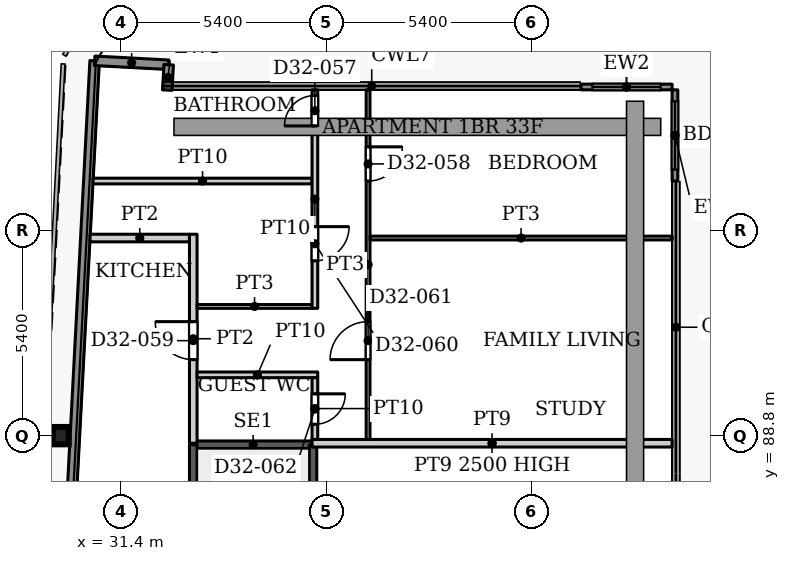
"""IFC4 building model, lengths in metres.
Left out: names, types, materials, properties, quantities, classifications, styles, units other than length and angle.
Written with IfcOpenShell. Run it as: python <this file> out.ifc"""

import sys

from ifc_helpers import new_model, si_unit, direction, frame, frame_2d, origin, origin_2d, place, context, subcontext, project, spatial, rectangle, i_section, extrude, source, transform, mapped, element, fill, save


model = new_model("IFC4")
c1 = context("Model", 3, precision=1e-05, world=origin(), true_north=direction((0.0, 1.0)))
c2 = subcontext(c1, "Body", "Model", "MODEL_VIEW")
j1 = project(units=[si_unit("LENGTHUNIT", "METRE"), si_unit("PLANEANGLEUNIT", "RADIAN")], contexts=[c1])
p1 = place(None, origin())
s1 = spatial("IfcSite", under=j1, at=p1, CompositionType="ELEMENT")
p2 = place(p1, origin())
s2 = spatial("IfcBuilding", under=s1, at=p2, CompositionType="ELEMENT")
p3 = place(p2, frame((0.0, 0.0, 140.9)))
s3 = spatial("IfcBuildingStorey", under=s2, at=p3, CompositionType="ELEMENT", Elevation=140.9)
p4 = place(p3, frame((29.811, 88.8, 0.0), z_axis=(0.0, 0.0, 1.0), x_axis=(1.0, 0.0, 0.0)))
e1 = element("IfcColumn", 1, at=p4, inside=s3, PredefinedType="COLUMN", context=c2, shape_type="SweptSolid", body=[
    extrude(i_section(OverallWidth=0.418, OverallDepth=0.455, WebThickness=0.042, FlangeThickness=0.068, FilletRadius=0.014, at=origin_2d()), origin(), (0.0, 0.0, 1.0), 3.9),
])
p5 = place(p3, frame((27.195, 31.969, 0.0), z_axis=(0.0, 0.0, 1.0), x_axis=(0.052554995867, 0.998618031286, 0.0)))
e2 = element("IfcWall", 2, at=p5, inside=s3, PredefinedType="SOLIDWALL", context=c2, shape_type="SweptSolid", body=[
    extrude(rectangle(XDim=66.787, YDim=0.25, at=frame_2d((33.394, 0.0))), origin(), (0.0, 0.0, 1.0), 3.75),
])
p6 = place(p3, frame((30.705, 98.664, 0.0), z_axis=(0.0, 0.0, 1.0), x_axis=(0.998577785791, -0.053314216913, 0.0)))
e3 = element("IfcWall", 3, at=p6, inside=s3, PredefinedType="SOLIDWALL", context=c2, shape_type="SweptSolid", body=[
    extrude(rectangle(XDim=1.951, YDim=0.25, at=frame_2d((0.975, 0.0))), origin(), (0.0, 0.0, 1.0), 3.75),
])
p7 = place(p3, frame((32.653, 98.56, 0.0), z_axis=(0.0, 0.0, 1.0), x_axis=(-0.054093451632, -0.998535877418, 0.0)))
e4 = element("IfcWall", 4, at=p7, inside=s3, PredefinedType="SOLIDWALL", context=c2, shape_type="SweptSolid", body=[
    extrude(rectangle(XDim=0.668, YDim=0.25, at=frame_2d((0.334, 0.0))), origin(), (0.0, 0.0, 1.0), 3.75),
])
p8 = place(p3, frame((43.5, 97.975, 0.0), z_axis=(0.0, 0.0, 1.0), x_axis=(1.0, 0.0, 0.0)))
e5 = element("IfcWall", 5, at=p8, inside=s3, PredefinedType="SOLIDWALL", context=c2, shape_type="SweptSolid", body=[
    extrude(rectangle(XDim=2.4, YDim=0.15, at=frame_2d((1.2, 0.0))), origin(), (0.0, 0.0, 1.0), 3.75),
])
p9 = place(p8, frame((0.3, 0.0, 0.0)))
e6 = element("IfcOpeningElement", 6, at=p9, cuts=e5, PredefinedType="OPENING", context=c2, shape_type="SweptSolid", body=[
    extrude(rectangle(XDim=1.8, YDim=2.4, at=frame_2d((0.9, 1.2))), frame((0.0, 0.085, 0.0), z_axis=(0.0, -1.0, 0.0), x_axis=(1.0, 0.0, 0.0)), (0.0, 0.0, 1.0), 0.17),
])
p10 = place(p3, frame((45.975, 97.9, 0.0), z_axis=(0.0, 0.0, 1.0), x_axis=(0.0, -1.0, 0.0)))
e7 = element("IfcWall", 7, at=p10, inside=s3, PredefinedType="SOLIDWALL", context=c2, shape_type="SweptSolid", body=[
    extrude(rectangle(XDim=2.4, YDim=0.15, at=frame_2d((1.2, 0.0))), origin(), (0.0, 0.0, 1.0), 3.75),
])
p11 = place(p10, frame((0.3, 0.0, 0.0)))
e8 = element("IfcOpeningElement", 8, at=p11, cuts=e7, PredefinedType="OPENING", context=c2, shape_type="SweptSolid", body=[
    extrude(rectangle(XDim=1.8, YDim=2.4, at=frame_2d((0.9, 1.2))), frame((0.0, 0.085, 0.0), z_axis=(0.0, -1.0, 0.0), x_axis=(1.0, 0.0, 0.0)), (0.0, 0.0, 1.0), 0.17),
])
p12 = place(p3, frame((33.3, 88.56, 0.0), z_axis=(0.0, 0.0, 1.0), x_axis=(1.0, 0.0, 0.0)))
e9 = element("IfcWall", 9, at=p12, inside=s3, PredefinedType="SHEAR", context=c2, shape_type="SweptSolid", body=[
    extrude(rectangle(XDim=3.15, YDim=0.2, at=frame_2d((1.575, 0.0))), origin(), (0.0, 0.0, 1.0), 3.9),
])
p13 = place(p3, frame((33.3, 79.4, 0.0), z_axis=(0.0, 0.0, 1.0), x_axis=(0.0, 1.0, 0.0)))
e10 = element("IfcWall", 10, at=p13, inside=s3, PredefinedType="SHEAR", context=c2, shape_type="SweptSolid", body=[
    extrude(rectangle(XDim=9.16, YDim=0.2, at=frame_2d((4.58, 0.0))), origin(), (0.0, 0.0, 1.0), 3.9),
])
p14 = place(p13, frame((0.35, 0.0, 0.0)))
e11 = element("IfcOpeningElement", 11, at=p14, cuts=e10, PredefinedType="OPENING", context=c2, shape_type="SweptSolid", body=[
    extrude(rectangle(XDim=1.1, YDim=2.2, at=frame_2d((0.55, 1.1))), frame((0.0, 0.11, 0.0), z_axis=(0.0, -1.0, 0.0), x_axis=(1.0, 0.0, 0.0)), (0.0, 0.0, 1.0), 0.22),
])
p15 = place(p3, frame((36.45, 79.4, 0.0), z_axis=(0.0, 0.0, 1.0), x_axis=(0.0, 1.0, 0.0)))
e12 = element("IfcWall", 12, at=p15, inside=s3, PredefinedType="SHEAR", context=c2, shape_type="SweptSolid", body=[
    extrude(rectangle(XDim=9.16, YDim=0.2, at=frame_2d((4.58, 0.0))), origin(), (0.0, 0.0, 1.0), 3.9),
])
p16 = place(p3, frame((30.664, 95.5, 0.0), z_axis=(0.0, 0.0, 1.0), x_axis=(1.0, 0.0, 0.0)))
e13 = element("IfcWall", 13, at=p16, inside=s3, PredefinedType="PARTITIONING", context=c2, shape_type="SweptSolid", body=[
    extrude(rectangle(XDim=5.761, YDim=0.15, at=frame_2d((2.88, 0.0))), origin(), (0.0, 0.0, 1.0), 3.6),
])
p17 = place(p3, frame((30.585, 94.0, 0.0), z_axis=(0.0, 0.0, 1.0), x_axis=(1.0, 0.0, 0.0)))
e14 = element("IfcWall", 14, at=p17, inside=s3, PredefinedType="PARTITIONING", context=c2, shape_type="SweptSolid", body=[
    extrude(rectangle(XDim=2.615, YDim=0.2, at=frame_2d((1.308, 0.0))), origin(), (0.0, 0.0, 1.0), 3.6),
])
p18 = place(p3, frame((33.3, 88.6, 0.0), z_axis=(0.0, 0.0, 1.0), x_axis=(0.0, 1.0, 0.0)))
e15 = element("IfcWall", 15, at=p18, inside=s3, PredefinedType="PARTITIONING", context=c2, shape_type="SweptSolid", body=[
    extrude(rectangle(XDim=5.5, YDim=0.2, at=frame_2d((2.75, 0.0))), origin(), (0.0, 0.0, 1.0), 3.6),
])
p19 = place(p18, frame((2.2, 0.0, 0.0)))
e16 = element("IfcOpeningElement", 16, at=p19, cuts=e15, PredefinedType="OPENING", context=c2, shape_type="SweptSolid", body=[
    extrude(rectangle(XDim=1.0, YDim=2.1, at=frame_2d((0.5, 1.05))), frame((0.0, 0.11, 0.0), z_axis=(0.0, -1.0, 0.0), x_axis=(1.0, 0.0, 0.0)), (0.0, 0.0, 1.0), 0.22),
])
p20 = place(p3, frame((33.4, 90.4, 0.0), z_axis=(0.0, 0.0, 1.0), x_axis=(1.0, 0.0, 0.0)))
e17 = element("IfcWall", 17, at=p20, inside=s3, PredefinedType="PARTITIONING", context=c2, shape_type="SweptSolid", body=[
    extrude(rectangle(XDim=3.175, YDim=0.15, at=frame_2d((1.587, 0.0))), origin(), (0.0, 0.0, 1.0), 3.6),
])
p21 = place(p3, frame((33.4, 92.2, 0.0), z_axis=(0.0, 0.0, 1.0), x_axis=(1.0, 0.0, 0.0)))
e18 = element("IfcWall", 18, at=p21, inside=s3, PredefinedType="PARTITIONING", context=c2, shape_type="SweptSolid", body=[
    extrude(rectangle(XDim=3.025, YDim=0.1, at=frame_2d((1.513, 0.0))), origin(), (0.0, 0.0, 1.0), 3.6),
])
p22 = place(p3, frame((36.425, 88.6, 0.0), z_axis=(0.0, 0.0, 1.0), x_axis=(1.0, 0.0, 0.0)))
e19 = element("IfcWall", 19, at=p22, inside=s3, PredefinedType="PARTITIONING", context=c2, shape_type="SweptSolid", body=[
    extrude(rectangle(XDim=9.475, YDim=0.2, at=frame_2d((4.737, 0.0))), origin(), (0.0, 0.0, 1.0), 2.5),
])
p23 = place(p3, frame((36.5, 88.7, 0.0), z_axis=(0.0, 0.0, 1.0), x_axis=(0.0, 1.0, 0.0)))
e20 = element("IfcWall", 20, at=p23, inside=s3, PredefinedType="PARTITIONING", context=c2, shape_type="SweptSolid", body=[
    extrude(rectangle(XDim=1.625, YDim=0.15, at=frame_2d((0.812, 0.0))), origin(), (0.0, 0.0, 1.0), 3.6),
])
p24 = place(p23, frame((0.4, 0.0, 0.0)))
e21 = element("IfcOpeningElement", 21, at=p24, cuts=e20, PredefinedType="OPENING", context=c2, shape_type="SweptSolid", body=[
    extrude(rectangle(XDim=0.8, YDim=2.1, at=frame_2d((0.4, 1.05))), frame((0.0, 0.085, 0.0), z_axis=(0.0, -1.0, 0.0), x_axis=(1.0, 0.0, 0.0)), (0.0, 0.0, 1.0), 0.17),
])
p25 = place(p3, frame((36.5, 92.15, 0.0), z_axis=(0.0, 0.0, 1.0), x_axis=(0.0, 1.0, 0.0)))
e22 = element("IfcWall", 22, at=p25, inside=s3, PredefinedType="PARTITIONING", context=c2, shape_type="SweptSolid", body=[
    extrude(rectangle(XDim=5.75, YDim=0.15, at=frame_2d((2.875, 0.0))), origin(), (0.0, 0.0, 1.0), 3.6),
])
p26 = place(p25, frame((4.8, 0.0, 0.0)))
e23 = element("IfcOpeningElement", 23, at=p26, cuts=e22, PredefinedType="OPENING", context=c2, shape_type="SweptSolid", body=[
    extrude(rectangle(XDim=0.8, YDim=2.1, at=frame_2d((0.4, 1.05))), frame((0.0, 0.085, 0.0), z_axis=(0.0, -1.0, 0.0), x_axis=(1.0, 0.0, 0.0)), (0.0, 0.0, 1.0), 0.17),
])
p27 = place(p25, frame((1.25, 0.0, 0.0)))
e24 = element("IfcOpeningElement", 24, at=p27, cuts=e22, PredefinedType="OPENING", context=c2, shape_type="SweptSolid", body=[
    extrude(rectangle(XDim=0.9, YDim=2.1, at=frame_2d((0.45, 1.05))), frame((0.0, 0.085, 0.0), z_axis=(0.0, -1.0, 0.0), x_axis=(1.0, 0.0, 0.0)), (0.0, 0.0, 1.0), 0.17),
])
p28 = place(p3, frame((37.9, 88.7, 0.0), z_axis=(0.0, 0.0, 1.0), x_axis=(0.0, 1.0, 0.0)))
e25 = element("IfcWall", 25, at=p28, inside=s3, PredefinedType="PARTITIONING", context=c2, shape_type="SweptSolid", body=[
    extrude(rectangle(XDim=9.2, YDim=0.1, at=frame_2d((4.6, 0.0))), origin(), (0.0, 0.0, 1.0), 3.6),
])
p29 = place(p28, frame((6.8, 0.0, 0.0)))
e26 = element("IfcOpeningElement", 26, at=p29, cuts=e25, PredefinedType="OPENING", context=c2, shape_type="SweptSolid", body=[
    extrude(rectangle(XDim=0.9, YDim=2.1, at=frame_2d((0.45, 1.05))), frame((0.0, 0.06, 0.0), z_axis=(0.0, -1.0, 0.0), x_axis=(1.0, 0.0, 0.0)), (0.0, 0.0, 1.0), 0.12),
])
p30 = place(p28, frame((2.1, 0.0, 0.0)))
e27 = element("IfcOpeningElement", 27, at=p30, cuts=e25, PredefinedType="OPENING", context=c2, shape_type="SweptSolid", body=[
    extrude(rectangle(XDim=1.0, YDim=2.1, at=frame_2d((0.5, 1.05))), frame((0.0, 0.06, 0.0), z_axis=(0.0, -1.0, 0.0), x_axis=(1.0, 0.0, 0.0)), (0.0, 0.0, 1.0), 0.12),
])
p31 = place(p3, frame((37.95, 94.0, 0.0), z_axis=(0.0, 0.0, 1.0), x_axis=(1.0, 0.0, 0.0)))
e28 = element("IfcWall", 28, at=p31, inside=s3, PredefinedType="PARTITIONING", context=c2, shape_type="SweptSolid", body=[
    extrude(rectangle(XDim=7.95, YDim=0.1, at=frame_2d((3.975, 0.0))), origin(), (0.0, 0.0, 1.0), 3.6),
])
m1 = source(origin(), c2, "Body", "SweptSolid", [
    extrude(rectangle(XDim=1.8, YDim=2.4, at=frame_2d((0.9, 1.2))), frame((0.0, 0.025, 0.0), z_axis=(0.0, -1.0, 0.0), x_axis=(1.0, 0.0, 0.0)), (0.0, 0.0, 1.0), 0.05),
])
p32 = place(p9, origin())
e29 = element("IfcDoor", 29, at=p32, inside=s3, OperationType="SLIDING_TO_LEFT", PredefinedType="DOOR", context=c2, shape_type="MappedRepresentation", body=[
    mapped(m1, transform((0.0, 0.0, 0.0), x_axis=(1.0, 0.0, 0.0), y_axis=(0.0, 1.0, 0.0), z_axis=(0.0, 0.0, 1.0), scale=1.0)),
])
fill(e6, e29)
p33 = place(p11, origin())
e30 = element("IfcDoor", 30, at=p33, inside=s3, OperationType="SLIDING_TO_LEFT", PredefinedType="DOOR", context=c2, shape_type="MappedRepresentation", body=[
    mapped(m1, transform((0.0, 0.0, 0.0), x_axis=(1.0, 0.0, 0.0), y_axis=(0.0, 1.0, 0.0), z_axis=(0.0, 0.0, 1.0), scale=1.0)),
])
fill(e8, e30)
m2 = source(origin(), c2, "Body", "SweptSolid", [
    extrude(rectangle(XDim=0.8, YDim=2.1, at=frame_2d((0.4, 1.05))), frame((0.0, 0.025, 0.0), z_axis=(0.0, -1.0, 0.0), x_axis=(1.0, 0.0, 0.0)), (0.0, 0.0, 1.0), 0.05),
])
p34 = place(p26, origin())
e31 = element("IfcDoor", 31, at=p34, inside=s3, OperationType="SINGLE_SWING_LEFT", PredefinedType="DOOR", context=c2, shape_type="MappedRepresentation", body=[
    mapped(m2, transform((0.0, 0.0, 0.0), x_axis=(1.0, 0.0, 0.0), y_axis=(0.0, 1.0, 0.0), z_axis=(0.0, 0.0, 1.0), scale=1.0)),
])
fill(e23, e31)
m3 = source(origin(), c2, "Body", "SweptSolid", [
    extrude(rectangle(XDim=0.9, YDim=2.1, at=frame_2d((0.45, 1.05))), frame((0.0, 0.025, 0.0), z_axis=(0.0, -1.0, 0.0), x_axis=(1.0, 0.0, 0.0)), (0.0, 0.0, 1.0), 0.05),
])
p35 = place(p29, origin())
e32 = element("IfcDoor", 32, at=p35, inside=s3, OperationType="SINGLE_SWING_RIGHT", PredefinedType="DOOR", context=c2, shape_type="MappedRepresentation", body=[
    mapped(m3, transform((0.0, 0.0, 0.0), x_axis=(1.0, 0.0, 0.0), y_axis=(0.0, 1.0, 0.0), z_axis=(0.0, 0.0, 1.0), scale=1.0)),
])
fill(e26, e32)
m4 = source(origin(), c2, "Body", "SweptSolid", [
    extrude(rectangle(XDim=1.0, YDim=2.1, at=frame_2d((0.5, 1.05))), frame((0.0, 0.025, 0.0), z_axis=(0.0, -1.0, 0.0), x_axis=(1.0, 0.0, 0.0)), (0.0, 0.0, 1.0), 0.05),
])
p36 = place(p19, origin())
e33 = element("IfcDoor", 33, at=p36, inside=s3, OperationType="SINGLE_SWING_LEFT", PredefinedType="DOOR", context=c2, shape_type="MappedRepresentation", body=[
    mapped(m4, transform((0.0, 0.0, 0.0), x_axis=(1.0, 0.0, 0.0), y_axis=(0.0, 1.0, 0.0), z_axis=(0.0, 0.0, 1.0), scale=1.0)),
])
fill(e16, e33)
p37 = place(p27, origin())
e34 = element("IfcDoor", 34, at=p37, inside=s3, OperationType="SINGLE_SWING_RIGHT", PredefinedType="DOOR", context=c2, shape_type="MappedRepresentation", body=[
    mapped(m3, transform((0.0, 0.0, 0.0), x_axis=(1.0, 0.0, 0.0), y_axis=(0.0, 1.0, 0.0), z_axis=(0.0, 0.0, 1.0), scale=1.0)),
])
fill(e24, e34)
m5 = source(origin(), c2, "Body", "SweptSolid", [
    extrude(rectangle(XDim=1.0, YDim=2.1, at=frame_2d((0.5, 1.05))), frame((0.0, 0.025, 0.0), z_axis=(0.0, -1.0, 0.0), x_axis=(1.0, 0.0, 0.0)), (0.0, 0.0, 1.0), 0.05),
])
p38 = place(p30, origin())
e35 = element("IfcDoor", 35, at=p38, inside=s3, OperationType="SINGLE_SWING_LEFT", PredefinedType="DOOR", context=c2, shape_type="MappedRepresentation", body=[
    mapped(m5, transform((0.0, 0.0, 0.0), x_axis=(1.0, 0.0, 0.0), y_axis=(0.0, 1.0, 0.0), z_axis=(0.0, 0.0, 1.0), scale=1.0)),
])
fill(e27, e35)
p39 = place(p24, origin())
e36 = element("IfcDoor", 36, at=p39, inside=s3, OperationType="SINGLE_SWING_RIGHT", PredefinedType="DOOR", context=c2, shape_type="MappedRepresentation", body=[
    mapped(m2, transform((0.0, 0.0, 0.0), x_axis=(1.0, 0.0, 0.0), y_axis=(0.0, 1.0, 0.0), z_axis=(0.0, 0.0, 1.0), scale=1.0)),
])
fill(e21, e36)
save(model, sys.argv[1])
